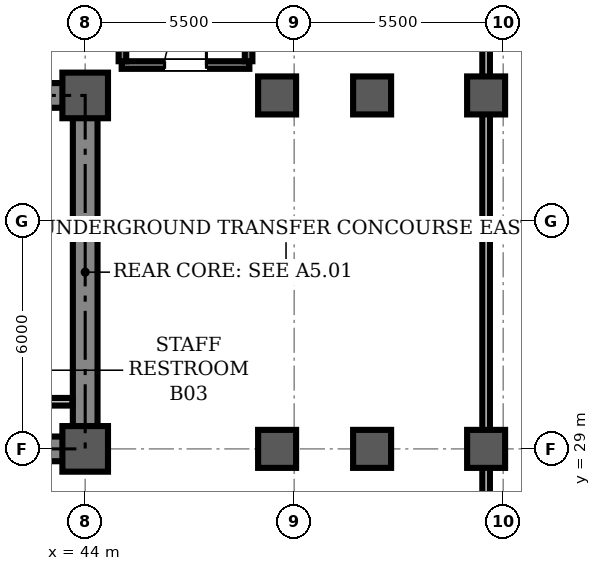
"""IFC4 building model, lengths in metres.
Left out: names, types, materials, properties, quantities, classifications, styles, units other than length and angle.
Written with IfcOpenShell. Run it as: python <this file> out.ifc"""

import sys

from ifc_helpers import new_model, si_unit, direction, frame, frame_2d, origin, origin_2d, place, context, subcontext, project, spatial, rectangle, hollow_rectangle, extrude, element, fill, save


model = new_model("IFC4")
c1 = context("Model", 3, precision=1e-05, world=origin(), true_north=direction((0.0, 1.0)))
c2 = subcontext(c1, "Body", "Model", "MODEL_VIEW")
j1 = project(units=[si_unit("LENGTHUNIT", "METRE"), si_unit("PLANEANGLEUNIT", "RADIAN")], contexts=[c1])
p1 = place(None, origin())
s1 = spatial("IfcSite", under=j1, at=p1, CompositionType="ELEMENT")
p2 = place(p1, origin())
s2 = spatial("IfcBuilding", under=s1, at=p2, CompositionType="ELEMENT")
p3 = place(p2, frame((0.0, 0.0, -15.6)))
s3 = spatial("IfcBuildingStorey", under=s2, at=p3, CompositionType="ELEMENT", Elevation=-15.6)
for number, where, z_axis, x_axis in (
    (1, (44.0, 29.0, 0.0), (0.0, 0.0, 1.0), (1.0, 0.0, 0.0)),
    (2, (44.0, 38.3, 0.0), (0.0, 0.0, 1.0), (1.0, 0.0, 0.0)),
):
    element("IfcColumn", number, at=place(p3, frame(where, z_axis=z_axis, x_axis=x_axis)), inside=s3, PredefinedType="COLUMN", context=c2, shape_type="SweptSolid", body=[
        extrude(hollow_rectangle(XDim=1.2, YDim=1.2, WallThickness=0.04, InnerFilletRadius=0.02, OuterFilletRadius=0.06, at=origin_2d()), origin(), (0.0, 0.0, 1.0), 5.4),
    ])
for number, where, z_axis, x_axis in (
    (3, (49.05, 29.0, 0.0), (0.0, 0.0, 1.0), (1.0, 0.0, 0.0)),
    (4, (49.05, 38.3, 0.0), (0.0, 0.0, 1.0), (1.0, 0.0, 0.0)),
    (5, (51.55, 29.0, 0.0), (0.0, 0.0, 1.0), (1.0, 0.0, 0.0)),
    (6, (51.55, 38.3, 0.0), (0.0, 0.0, 1.0), (1.0, 0.0, 0.0)),
    (7, (54.55, 29.0, 0.0), (0.0, 0.0, 1.0), (1.0, 0.0, 0.0)),
    (8, (54.55, 38.3, 0.0), (0.0, 0.0, 1.0), (1.0, 0.0, 0.0)),
):
    element("IfcColumn", number, at=place(p3, frame(where, z_axis=z_axis, x_axis=x_axis)), inside=s3, PredefinedType="COLUMN", context=c2, shape_type="SweptSolid", body=[
        extrude(rectangle(XDim=1.0, YDim=1.0, at=origin_2d()), origin(), (0.0, 0.0, 1.0), 5.4),
    ])
p4 = place(p3, frame((13.5, 29.0, 0.0), z_axis=(0.0, 0.0, 1.0), x_axis=(1.0, 0.0, 0.0)))
e9 = element("IfcWall", 9, at=p4, inside=s3, PredefinedType="SHEAR", context=c2, shape_type="SweptSolid", body=[
    extrude(rectangle(XDim=30.5, YDim=0.65, at=frame_2d((15.25, 0.0))), origin(), (0.0, 0.0, 1.0), 5.12),
])
p5 = place(p4, frame((1.75, 0.0, 0.0)))
e10 = element("IfcOpeningElement", 10, at=p5, cuts=e9, PredefinedType="OPENING", context=c2, shape_type="SweptSolid", body=[
    extrude(rectangle(XDim=1.1, YDim=2.08, at=frame_2d((0.55, 1.04))), frame((0.0, 0.335, 0.0), z_axis=(0.0, -1.0, 0.0), x_axis=(1.0, 0.0, 0.0)), (0.0, 0.0, 1.0), 0.67),
])
p6 = place(p4, frame((26.7, 0.0, 0.0)))
e11 = element("IfcOpeningElement", 11, at=p6, cuts=e9, PredefinedType="OPENING", context=c2, shape_type="SweptSolid", body=[
    extrude(rectangle(XDim=1.1, YDim=2.08, at=frame_2d((0.55, 1.04))), frame((0.0, 0.335, 0.0), z_axis=(0.0, -1.0, 0.0), x_axis=(1.0, 0.0, 0.0)), (0.0, 0.0, 1.0), 0.67),
])
p7 = place(p4, frame((6.8, 0.0, 0.0)))
e12 = element("IfcOpeningElement", 12, at=p7, cuts=e9, PredefinedType="OPENING", context=c2, shape_type="SweptSolid", body=[
    extrude(rectangle(XDim=1.1, YDim=2.08, at=frame_2d((0.55, 1.04))), frame((0.0, 0.335, 0.0), z_axis=(0.0, -1.0, 0.0), x_axis=(1.0, 0.0, 0.0)), (0.0, 0.0, 1.0), 0.67),
])
p8 = place(p4, frame((14.3, 0.0, 0.0)))
e13 = element("IfcOpeningElement", 13, at=p8, cuts=e9, PredefinedType="OPENING", context=c2, shape_type="SweptSolid", body=[
    extrude(rectangle(XDim=1.6, YDim=2.08, at=frame_2d((0.8, 1.04))), frame((0.0, 0.335, 0.0), z_axis=(0.0, -1.0, 0.0), x_axis=(1.0, 0.0, 0.0)), (0.0, 0.0, 1.0), 0.67),
])
p9 = place(p4, frame((19.53, 0.0, 0.0)))
e14 = element("IfcOpeningElement", 14, at=p9, cuts=e9, PredefinedType="OPENING", context=c2, shape_type="SweptSolid", body=[
    extrude(rectangle(XDim=0.9, YDim=2.08, at=frame_2d((0.45, 1.04))), frame((0.0, 0.335, 0.0), z_axis=(0.0, -1.0, 0.0), x_axis=(1.0, 0.0, 0.0)), (0.0, 0.0, 1.0), 0.67),
])
p10 = place(p4, frame((21.57, 0.0, 0.0)))
e15 = element("IfcOpeningElement", 15, at=p10, cuts=e9, PredefinedType="OPENING", context=c2, shape_type="SweptSolid", body=[
    extrude(rectangle(XDim=0.9, YDim=2.08, at=frame_2d((0.45, 1.04))), frame((0.0, 0.335, 0.0), z_axis=(0.0, -1.0, 0.0), x_axis=(1.0, 0.0, 0.0)), (0.0, 0.0, 1.0), 0.67),
])
p11 = place(p4, frame((12.1, 0.0, 0.0)))
e16 = element("IfcOpeningElement", 16, at=p11, cuts=e9, PredefinedType="OPENING", context=c2, shape_type="SweptSolid", body=[
    extrude(rectangle(XDim=1.3, YDim=2.08, at=frame_2d((0.65, 1.04))), frame((0.0, 0.335, 0.0), z_axis=(0.0, -1.0, 0.0), x_axis=(1.0, 0.0, 0.0)), (0.0, 0.0, 1.0), 0.67),
])
p12 = place(p3, frame((13.5, 38.3, 0.0), z_axis=(0.0, 0.0, 1.0), x_axis=(1.0, 0.0, 0.0)))
e17 = element("IfcWall", 17, at=p12, inside=s3, PredefinedType="SHEAR", context=c2, shape_type="SweptSolid", body=[
    extrude(rectangle(XDim=30.5, YDim=0.65, at=frame_2d((15.25, 0.0))), origin(), (0.0, 0.0, 1.0), 5.12),
])
p13 = place(p3, frame((44.0, 29.35, 0.0), z_axis=(0.0, 0.0, 1.0), x_axis=(0.0, 1.0, 0.0)))
e18 = element("IfcWall", 18, at=p13, inside=s3, PredefinedType="SHEAR", context=c2, shape_type="SweptSolid", body=[
    extrude(rectangle(XDim=8.6, YDim=0.65, at=frame_2d((4.3, 0.0))), origin(), (0.0, 0.0, 1.0), 5.12),
])
p14 = place(p3, frame((44.96, 39.1, 0.0), z_axis=(0.0, 0.0, 1.0), x_axis=(1.0, 0.0, 0.0)))
e19 = element("IfcWall", 19, at=p14, inside=s3, PredefinedType="STANDARD", context=c2, shape_type="SweptSolid", body=[
    extrude(rectangle(XDim=3.36, YDim=0.2, at=frame_2d((1.68, 0.0))), origin(), (0.0, 0.0, 1.0), 5.12),
])
p15 = place(p14, frame((1.13, 0.0, 0.0)))
e20 = element("IfcOpeningElement", 20, at=p15, cuts=e19, PredefinedType="OPENING", context=c2, shape_type="SweptSolid", body=[
    extrude(rectangle(XDim=1.1, YDim=2.08, at=frame_2d((0.55, 1.04))), frame((0.0, 0.11, 0.0), z_axis=(0.0, -1.0, 0.0), x_axis=(1.0, 0.0, 0.0)), (0.0, 0.0, 1.0), 0.22),
])
for number, where, z_axis, x_axis in (
    (21, (44.98, 39.2, 0.0), (0.0, 0.0, 1.0), (0.0, 1.0, 0.0)),
    (22, (48.3, 39.2, 0.0), (0.0, 0.0, 1.0), (0.0, 1.0, 0.0)),
):
    element("IfcWall", number, at=place(p3, frame(where, z_axis=z_axis, x_axis=x_axis)), inside=s3, PredefinedType="STANDARD", context=c2, shape_type="SweptSolid", body=[
        extrude(rectangle(XDim=6.58, YDim=0.2, at=frame_2d((3.29, 0.0))), origin(), (0.0, 0.0, 1.0), 5.12),
    ])
p16 = place(p3, frame((42.4, 30.24, 0.0), z_axis=(0.0, 0.0, 1.0), x_axis=(1.0, 0.0, 0.0)))
e23 = element("IfcWall", 23, at=p16, inside=s3, PredefinedType="STANDARD", context=c2, shape_type="SweptSolid", body=[
    extrude(rectangle(XDim=1.265, YDim=0.2, at=frame_2d((0.633, 0.0))), origin(), (0.0, 0.0, 1.0), 4.4),
])
p17 = place(p3, frame((54.55, 0.4, 0.0), z_axis=(0.0, 0.0, 1.0), x_axis=(0.0, 1.0, 0.0)))
e24 = element("IfcWall", 24, at=p17, inside=s3, PredefinedType="STANDARD", context=c2, shape_type="SweptSolid", body=[
    extrude(rectangle(XDim=50.8, YDim=0.2, at=frame_2d((25.4, 0.0))), origin(), (0.0, 0.0, 1.0), 4.3),
])
p18 = place(p17, frame((21.9, 0.0, 0.0)))
e25 = element("IfcOpeningElement", 25, at=p18, cuts=e24, PredefinedType="OPENING", context=c2, shape_type="SweptSolid", body=[
    extrude(rectangle(XDim=1.1, YDim=2.08, at=frame_2d((0.55, 1.04))), frame((0.0, 0.11, 0.0), z_axis=(0.0, -1.0, 0.0), x_axis=(1.0, 0.0, 0.0)), (0.0, 0.0, 1.0), 0.22),
])
p19 = place(p15, origin())
e26 = element("IfcDoor", 26, at=p19, inside=s3, OperationType="SINGLE_SWING_RIGHT", PredefinedType="DOOR", context=c2, shape_type="SweptSolid", body=[
    extrude(rectangle(XDim=1.1, YDim=2.08, at=frame_2d((0.55, 1.04))), frame((0.0, 0.025, 0.0), z_axis=(0.0, -1.0, 0.0), x_axis=(1.0, 0.0, 0.0)), (0.0, 0.0, 1.0), 0.05),
])
fill(e20, e26)
save(model, sys.argv[1])
